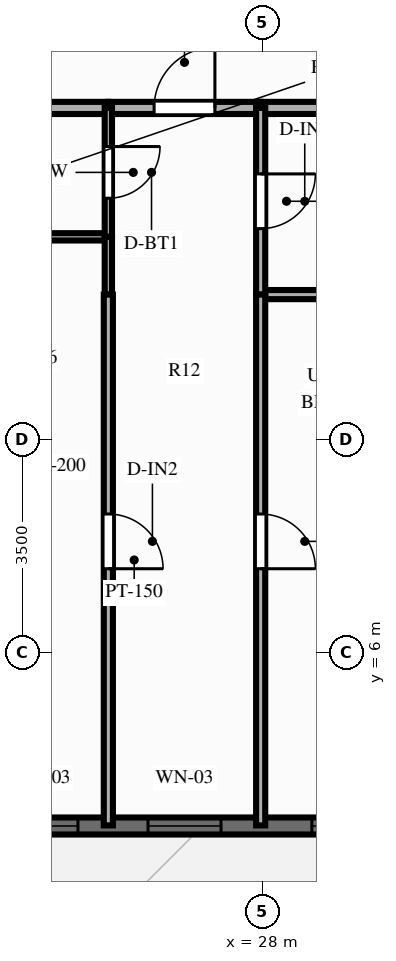
"""IFC4 building model, lengths in metres.
Left out: names, types, materials, properties, quantities, classifications, styles, units other than length and angle.
Written with IfcOpenShell. Run it as: python <this file> out.ifc"""

import sys

from ifc_helpers import new_model, si_unit, direction, frame, frame_2d, origin, place, context, subcontext, project, spatial, rectangle, extrude, source, transform, mapped, element, fill, save


model = new_model("IFC4")
c1 = context("Model", 3, precision=1e-05, world=origin(), true_north=direction((0.0, 1.0)))
c2 = subcontext(c1, "Body", "Model", "MODEL_VIEW")
j1 = project(units=[si_unit("LENGTHUNIT", "METRE"), si_unit("PLANEANGLEUNIT", "RADIAN")], contexts=[c1])
p1 = place(None, origin())
s1 = spatial("IfcSite", under=j1, at=p1, CompositionType="ELEMENT")
p2 = place(p1, origin())
s2 = spatial("IfcBuilding", under=s1, at=p2, CompositionType="ELEMENT")
p3 = place(p2, frame((0.0, 0.0, 25.4)))
s3 = spatial("IfcBuildingStorey", under=s2, at=p3, CompositionType="ELEMENT", Elevation=25.4)
p4 = place(p3, frame((15.5, 3.14, 0.0), z_axis=(0.0, 0.0, 1.0), x_axis=(1.0, 0.0, 0.0)))
e1 = element("IfcWall", 1, at=p4, inside=s3, PredefinedType="SOLIDWALL", context=c2, shape_type="SweptSolid", body=[
    extrude(rectangle(XDim=45.0, YDim=0.28, at=frame_2d((22.5, 0.0))), origin(), (0.0, 0.0, 1.0), 2.28),
])
p5 = place(p4, frame((0.785, 0.0, 0.25)))
e2 = element("IfcOpeningElement", 2, at=p5, cuts=e1, PredefinedType="OPENING", context=c2, shape_type="SweptSolid", body=[
    extrude(rectangle(XDim=1.2, YDim=1.5, at=frame_2d((0.6, 0.75))), frame((0.0, 0.152, 0.0), z_axis=(0.0, -1.0, 0.0), x_axis=(1.0, 0.0, 0.0)), (0.0, 0.0, 1.0), 0.304),
])
p6 = place(p4, frame((3.033, 0.0, 0.25)))
e3 = element("IfcOpeningElement", 3, at=p6, cuts=e1, PredefinedType="OPENING", context=c2, shape_type="SweptSolid", body=[
    extrude(rectangle(XDim=1.2, YDim=1.5, at=frame_2d((0.6, 0.75))), frame((0.0, 0.152, 0.0), z_axis=(0.0, -1.0, 0.0), x_axis=(1.0, 0.0, 0.0)), (0.0, 0.0, 1.0), 0.304),
])
p7 = place(p4, frame((5.727, 0.0, 0.25)))
e4 = element("IfcOpeningElement", 4, at=p7, cuts=e1, PredefinedType="OPENING", context=c2, shape_type="SweptSolid", body=[
    extrude(rectangle(XDim=1.2, YDim=1.5, at=frame_2d((0.6, 0.75))), frame((0.0, 0.152, 0.0), z_axis=(0.0, -1.0, 0.0), x_axis=(1.0, 0.0, 0.0)), (0.0, 0.0, 1.0), 0.304),
])
p8 = place(p4, frame((8.269, 0.0, 0.25)))
e5 = element("IfcOpeningElement", 5, at=p8, cuts=e1, PredefinedType="OPENING", context=c2, shape_type="SweptSolid", body=[
    extrude(rectangle(XDim=1.2, YDim=1.5, at=frame_2d((0.6, 0.75))), frame((0.0, 0.152, 0.0), z_axis=(0.0, -1.0, 0.0), x_axis=(1.0, 0.0, 0.0)), (0.0, 0.0, 1.0), 0.304),
])
p9 = place(p4, frame((10.621, 0.0, 0.25)))
e6 = element("IfcOpeningElement", 6, at=p9, cuts=e1, PredefinedType="OPENING", context=c2, shape_type="SweptSolid", body=[
    extrude(rectangle(XDim=1.2, YDim=1.5, at=frame_2d((0.6, 0.75))), frame((0.0, 0.152, 0.0), z_axis=(0.0, -1.0, 0.0), x_axis=(1.0, 0.0, 0.0)), (0.0, 0.0, 1.0), 0.304),
])
p10 = place(p4, frame((13.316, 0.0, 0.25)))
e7 = element("IfcOpeningElement", 7, at=p10, cuts=e1, PredefinedType="OPENING", context=c2, shape_type="SweptSolid", body=[
    extrude(rectangle(XDim=1.2, YDim=1.5, at=frame_2d((0.6, 0.75))), frame((0.0, 0.152, 0.0), z_axis=(0.0, -1.0, 0.0), x_axis=(1.0, 0.0, 0.0)), (0.0, 0.0, 1.0), 0.304),
])
p11 = place(p4, frame((16.624, 0.0, 0.25)))
e8 = element("IfcOpeningElement", 8, at=p11, cuts=e1, PredefinedType="OPENING", context=c2, shape_type="SweptSolid", body=[
    extrude(rectangle(XDim=0.7, YDim=1.5, at=frame_2d((0.35, 0.75))), frame((0.0, 0.152, 0.0), z_axis=(0.0, -1.0, 0.0), x_axis=(1.0, 0.0, 0.0)), (0.0, 0.0, 1.0), 0.304),
])
p12 = place(p4, frame((18.141, 0.0, 0.25)))
e9 = element("IfcOpeningElement", 9, at=p12, cuts=e1, PredefinedType="OPENING", context=c2, shape_type="SweptSolid", body=[
    extrude(rectangle(XDim=1.2, YDim=1.5, at=frame_2d((0.6, 0.75))), frame((0.0, 0.152, 0.0), z_axis=(0.0, -1.0, 0.0), x_axis=(1.0, 0.0, 0.0)), (0.0, 0.0, 1.0), 0.304),
])
p13 = place(p4, frame((21.874, 0.0, 0.0), z_axis=(0.0, 0.0, 1.0), x_axis=(-1.0, 0.0, 0.0)))
e10 = element("IfcOpeningElement", 10, at=p13, cuts=e1, PredefinedType="OPENING", context=c2, shape_type="SweptSolid", body=[
    extrude(rectangle(XDim=1.1, YDim=2.15, at=frame_2d((0.55, 1.075))), frame((0.0, 0.152, 0.0), z_axis=(0.0, -1.0, 0.0), x_axis=(1.0, 0.0, 0.0)), (0.0, 0.0, 1.0), 0.304),
])
p14 = place(p4, frame((23.223, 0.0, 0.25)))
e11 = element("IfcOpeningElement", 11, at=p14, cuts=e1, PredefinedType="OPENING", context=c2, shape_type="SweptSolid", body=[
    extrude(rectangle(XDim=1.2, YDim=1.5, at=frame_2d((0.6, 0.75))), frame((0.0, 0.152, 0.0), z_axis=(0.0, -1.0, 0.0), x_axis=(1.0, 0.0, 0.0)), (0.0, 0.0, 1.0), 0.304),
])
p15 = place(p4, frame((25.507, 0.0, 0.25)))
e12 = element("IfcOpeningElement", 12, at=p15, cuts=e1, PredefinedType="OPENING", context=c2, shape_type="SweptSolid", body=[
    extrude(rectangle(XDim=1.2, YDim=1.5, at=frame_2d((0.6, 0.75))), frame((0.0, 0.152, 0.0), z_axis=(0.0, -1.0, 0.0), x_axis=(1.0, 0.0, 0.0)), (0.0, 0.0, 1.0), 0.304),
])
p16 = place(p4, frame((27.6, 0.0, 0.25)))
e13 = element("IfcOpeningElement", 13, at=p16, cuts=e1, PredefinedType="OPENING", context=c2, shape_type="SweptSolid", body=[
    extrude(rectangle(XDim=0.7, YDim=1.5, at=frame_2d((0.35, 0.75))), frame((0.0, 0.152, 0.0), z_axis=(0.0, -1.0, 0.0), x_axis=(1.0, 0.0, 0.0)), (0.0, 0.0, 1.0), 0.304),
])
p17 = place(p4, frame((30.589, 0.0, 0.25)))
e14 = element("IfcOpeningElement", 14, at=p17, cuts=e1, PredefinedType="OPENING", context=c2, shape_type="SweptSolid", body=[
    extrude(rectangle(XDim=1.2, YDim=1.5, at=frame_2d((0.6, 0.75))), frame((0.0, 0.152, 0.0), z_axis=(0.0, -1.0, 0.0), x_axis=(1.0, 0.0, 0.0)), (0.0, 0.0, 1.0), 0.304),
])
p18 = place(p4, frame((32.872, 0.0, 0.25)))
e15 = element("IfcOpeningElement", 15, at=p18, cuts=e1, PredefinedType="OPENING", context=c2, shape_type="SweptSolid", body=[
    extrude(rectangle(XDim=1.2, YDim=1.5, at=frame_2d((0.6, 0.75))), frame((0.0, 0.152, 0.0), z_axis=(0.0, -1.0, 0.0), x_axis=(1.0, 0.0, 0.0)), (0.0, 0.0, 1.0), 0.304),
])
p19 = place(p4, frame((35.455, 0.0, 0.25)))
e16 = element("IfcOpeningElement", 16, at=p19, cuts=e1, PredefinedType="OPENING", context=c2, shape_type="SweptSolid", body=[
    extrude(rectangle(XDim=1.2, YDim=1.5, at=frame_2d((0.6, 0.75))), frame((0.0, 0.152, 0.0), z_axis=(0.0, -1.0, 0.0), x_axis=(1.0, 0.0, 0.0)), (0.0, 0.0, 1.0), 0.304),
])
p20 = place(p4, frame((37.954, 0.0, 0.25)))
e17 = element("IfcOpeningElement", 17, at=p20, cuts=e1, PredefinedType="OPENING", context=c2, shape_type="SweptSolid", body=[
    extrude(rectangle(XDim=1.2, YDim=1.5, at=frame_2d((0.6, 0.75))), frame((0.0, 0.152, 0.0), z_axis=(0.0, -1.0, 0.0), x_axis=(1.0, 0.0, 0.0)), (0.0, 0.0, 1.0), 0.304),
])
p21 = place(p4, frame((40.238, 0.0, 0.25)))
e18 = element("IfcOpeningElement", 18, at=p21, cuts=e1, PredefinedType="OPENING", context=c2, shape_type="SweptSolid", body=[
    extrude(rectangle(XDim=1.2, YDim=1.5, at=frame_2d((0.6, 0.75))), frame((0.0, 0.152, 0.0), z_axis=(0.0, -1.0, 0.0), x_axis=(1.0, 0.0, 0.0)), (0.0, 0.0, 1.0), 0.304),
])
p22 = place(p4, frame((42.716, 0.0, 0.25)))
e19 = element("IfcOpeningElement", 19, at=p22, cuts=e1, PredefinedType="OPENING", context=c2, shape_type="SweptSolid", body=[
    extrude(rectangle(XDim=1.2, YDim=1.5, at=frame_2d((0.6, 0.75))), frame((0.0, 0.152, 0.0), z_axis=(0.0, -1.0, 0.0), x_axis=(1.0, 0.0, 0.0)), (0.0, 0.0, 1.0), 0.304),
])
p23 = place(p3, frame((23.269, 14.95, 0.0), z_axis=(0.0, 0.0, 1.0), x_axis=(1.0, 0.0, 0.0)))
e20 = element("IfcWall", 20, at=p23, inside=s3, PredefinedType="PARTITIONING", context=c2, shape_type="SweptSolid", body=[
    extrude(rectangle(XDim=2.2, YDim=0.2, at=frame_2d((1.1, 0.0))), origin(), (0.0, 0.0, 1.0), 2.79),
])
p24 = place(p3, frame((25.469, 14.95, 0.0), z_axis=(0.0, 0.0, 1.0), x_axis=(1.0, 0.0, 0.0)))
e21 = element("IfcWall", 21, at=p24, inside=s3, PredefinedType="PARTITIONING", context=c2, shape_type="SweptSolid", body=[
    extrude(rectangle(XDim=2.505, YDim=0.2, at=frame_2d((1.252, 0.0))), origin(), (0.0, 0.0, 1.0), 2.79),
])
p25 = place(p24, frame((0.752, 0.0, 0.0)))
e22 = element("IfcOpeningElement", 22, at=p25, cuts=e21, PredefinedType="OPENING", context=c2, shape_type="SweptSolid", body=[
    extrude(rectangle(XDim=1.0, YDim=2.15, at=frame_2d((0.5, 1.075))), frame((0.0, 0.112, 0.0), z_axis=(0.0, -1.0, 0.0), x_axis=(1.0, 0.0, 0.0)), (0.0, 0.0, 1.0), 0.224),
])
p26 = place(p3, frame((27.974, 14.95, 0.0), z_axis=(0.0, 0.0, 1.0), x_axis=(1.0, 0.0, 0.0)))
e23 = element("IfcWall", 23, at=p26, inside=s3, PredefinedType="PARTITIONING", context=c2, shape_type="SweptSolid", body=[
    extrude(rectangle(XDim=2.884, YDim=0.2, at=frame_2d((1.442, 0.0))), origin(), (0.0, 0.0, 1.0), 2.79),
])
p27 = place(p3, frame((23.269, 12.83, 0.0), z_axis=(0.0, 0.0, 1.0), x_axis=(1.0, 0.0, 0.0)))
e24 = element("IfcWall", 24, at=p27, inside=s3, PredefinedType="PARTITIONING", context=c2, shape_type="SweptSolid", body=[
    extrude(rectangle(XDim=2.2, YDim=0.12, at=frame_2d((1.1, 0.0))), origin(), (0.0, 0.0, 1.0), 2.79),
])
p28 = place(p3, frame((27.974, 11.88, 0.0), z_axis=(0.0, 0.0, 1.0), x_axis=(1.0, 0.0, 0.0)))
e25 = element("IfcWall", 25, at=p28, inside=s3, PredefinedType="PARTITIONING", context=c2, shape_type="SweptSolid", body=[
    extrude(rectangle(XDim=2.884, YDim=0.15, at=frame_2d((1.442, 0.0))), origin(), (0.0, 0.0, 1.0), 2.79),
])
p29 = place(p3, frame((25.469, 14.95, 0.0), z_axis=(0.0, 0.0, 1.0), x_axis=(0.0, -1.0, 0.0)))
e26 = element("IfcWall", 26, at=p29, inside=s3, PredefinedType="PARTITIONING", context=c2, shape_type="SweptSolid", body=[
    extrude(rectangle(XDim=2.12, YDim=0.12, at=frame_2d((1.06, 0.0))), origin(), (0.0, 0.0, 1.0), 2.79),
])
p30 = place(p29, frame((0.635, 0.0, 0.0)))
e27 = element("IfcOpeningElement", 27, at=p30, cuts=e26, PredefinedType="OPENING", context=c2, shape_type="SweptSolid", body=[
    extrude(rectangle(XDim=0.85, YDim=2.05, at=frame_2d((0.425, 1.025))), frame((0.0, 0.072, 0.0), z_axis=(0.0, -1.0, 0.0), x_axis=(1.0, 0.0, 0.0)), (0.0, 0.0, 1.0), 0.144),
])
p31 = place(p3, frame((25.469, 12.83, 0.0), z_axis=(0.0, 0.0, 1.0), x_axis=(0.0, -1.0, 0.0)))
e28 = element("IfcWall", 28, at=p31, inside=s3, PredefinedType="PARTITIONING", context=c2, shape_type="SweptSolid", body=[
    extrude(rectangle(XDim=0.95, YDim=0.12, at=frame_2d((0.475, 0.0))), origin(), (0.0, 0.0, 1.0), 2.79),
])
p32 = place(p3, frame((25.469, 11.88, 0.0), z_axis=(0.0, 0.0, 1.0), x_axis=(0.0, -1.0, 0.0)))
e29 = element("IfcWall", 29, at=p32, inside=s3, PredefinedType="PARTITIONING", context=c2, shape_type="SweptSolid", body=[
    extrude(rectangle(XDim=8.73, YDim=0.15, at=frame_2d((4.365, 0.0))), origin(), (0.0, 0.0, 1.0), 2.79),
])
p33 = place(p32, frame((3.609, 0.0, 0.0)))
e30 = element("IfcOpeningElement", 30, at=p33, cuts=e29, PredefinedType="OPENING", context=c2, shape_type="SweptSolid", body=[
    extrude(rectangle(XDim=0.9, YDim=2.1, at=frame_2d((0.45, 1.05))), frame((0.0, 0.087, 0.0), z_axis=(0.0, -1.0, 0.0), x_axis=(1.0, 0.0, 0.0)), (0.0, 0.0, 1.0), 0.174),
])
p34 = place(p3, frame((27.974, 14.95, 0.0), z_axis=(0.0, 0.0, 1.0), x_axis=(0.0, -1.0, 0.0)))
e31 = element("IfcWall", 31, at=p34, inside=s3, PredefinedType="PARTITIONING", context=c2, shape_type="SweptSolid", body=[
    extrude(rectangle(XDim=3.07, YDim=0.15, at=frame_2d((1.535, 0.0))), origin(), (0.0, 0.0, 1.0), 2.79),
])
p35 = place(p34, frame((1.085, 0.0, 0.0)))
e32 = element("IfcOpeningElement", 32, at=p35, cuts=e31, PredefinedType="OPENING", context=c2, shape_type="SweptSolid", body=[
    extrude(rectangle(XDim=0.9, YDim=2.1, at=frame_2d((0.45, 1.05))), frame((0.0, 0.087, 0.0), z_axis=(0.0, -1.0, 0.0), x_axis=(1.0, 0.0, 0.0)), (0.0, 0.0, 1.0), 0.174),
])
p36 = place(p3, frame((27.974, 11.88, 0.0), z_axis=(0.0, 0.0, 1.0), x_axis=(0.0, -1.0, 0.0)))
e33 = element("IfcWall", 33, at=p36, inside=s3, PredefinedType="PARTITIONING", context=c2, shape_type="SweptSolid", body=[
    extrude(rectangle(XDim=8.73, YDim=0.15, at=frame_2d((4.365, 0.0))), origin(), (0.0, 0.0, 1.0), 2.79),
])
p37 = place(p36, frame((3.609, 0.0, 0.0)))
e34 = element("IfcOpeningElement", 34, at=p37, cuts=e33, PredefinedType="OPENING", context=c2, shape_type="SweptSolid", body=[
    extrude(rectangle(XDim=0.9, YDim=2.1, at=frame_2d((0.45, 1.05))), frame((0.0, 0.087, 0.0), z_axis=(0.0, -1.0, 0.0), x_axis=(1.0, 0.0, 0.0)), (0.0, 0.0, 1.0), 0.174),
])
m1 = source(origin(), c2, "Body", "SweptSolid", [
    extrude(rectangle(XDim=1.2, YDim=1.5, at=frame_2d((0.6, 0.75))), frame((0.0, 0.03, 0.0), z_axis=(0.0, -1.0, 0.0), x_axis=(1.0, 0.0, 0.0)), (0.0, 0.0, 1.0), 0.06),
])
p38 = place(p8, origin())
e35 = element("IfcWindow", 35, at=p38, inside=s3, PartitioningType="SINGLE_PANEL", PredefinedType="WINDOW", context=c2, shape_type="MappedRepresentation", body=[
    mapped(m1, transform((0.0, 0.0, 0.0), scale=1.0)),
])
fill(e5, e35)
p39 = place(p9, origin())
e36 = element("IfcWindow", 36, at=p39, inside=s3, PartitioningType="SINGLE_PANEL", PredefinedType="WINDOW", context=c2, shape_type="MappedRepresentation", body=[
    mapped(m1, transform((0.0, 0.0, 0.0), scale=1.0)),
])
fill(e6, e36)
p40 = place(p10, origin())
e37 = element("IfcWindow", 37, at=p40, inside=s3, PartitioningType="SINGLE_PANEL", PredefinedType="WINDOW", context=c2, shape_type="MappedRepresentation", body=[
    mapped(m1, transform((0.0, 0.0, 0.0), scale=1.0)),
])
fill(e7, e37)
m2 = source(origin(), c2, "Body", "SweptSolid", [
    extrude(rectangle(XDim=1.0, YDim=2.15, at=frame_2d((0.5, 1.075))), frame((0.0, 0.025, 0.0), z_axis=(0.0, -1.0, 0.0), x_axis=(1.0, 0.0, 0.0)), (0.0, 0.0, 1.0), 0.05),
])
p41 = place(p25, origin())
e38 = element("IfcDoor", 38, at=p41, inside=s3, OperationType="SINGLE_SWING_RIGHT", PredefinedType="DOOR", context=c2, shape_type="MappedRepresentation", body=[
    mapped(m2, transform((0.0, 0.0, 0.0), scale=1.0)),
])
fill(e22, e38)
m3 = source(origin(), c2, "Body", "SweptSolid", [
    extrude(rectangle(XDim=0.85, YDim=2.05, at=frame_2d((0.425, 1.025))), frame((0.0, 0.025, 0.0), z_axis=(0.0, -1.0, 0.0), x_axis=(1.0, 0.0, 0.0)), (0.0, 0.0, 1.0), 0.05),
])
p42 = place(p30, origin())
e39 = element("IfcDoor", 39, at=p42, inside=s3, OperationType="SINGLE_SWING_LEFT", PredefinedType="DOOR", context=c2, shape_type="MappedRepresentation", body=[
    mapped(m3, transform((0.0, 0.0, 0.0), scale=1.0)),
])
fill(e27, e39)
m4 = source(origin(), c2, "Body", "SweptSolid", [
    extrude(rectangle(XDim=0.9, YDim=2.1, at=frame_2d((0.45, 1.05))), frame((0.0, 0.025, 0.0), z_axis=(0.0, -1.0, 0.0), x_axis=(1.0, 0.0, 0.0)), (0.0, 0.0, 1.0), 0.05),
])
p43 = place(p33, origin())
e40 = element("IfcDoor", 40, at=p43, inside=s3, OperationType="SINGLE_SWING_RIGHT", PredefinedType="DOOR", context=c2, shape_type="MappedRepresentation", body=[
    mapped(m4, transform((0.0, 0.0, 0.0), scale=1.0)),
])
fill(e30, e40)
p44 = place(p35, origin())
e41 = element("IfcDoor", 41, at=p44, inside=s3, OperationType="SINGLE_SWING_LEFT", PredefinedType="DOOR", context=c2, shape_type="MappedRepresentation", body=[
    mapped(m4, transform((0.0, 0.0, 0.0), scale=1.0)),
])
fill(e32, e41)
p45 = place(p37, origin())
e42 = element("IfcDoor", 42, at=p45, inside=s3, OperationType="SINGLE_SWING_RIGHT", PredefinedType="DOOR", context=c2, shape_type="MappedRepresentation", body=[
    mapped(m4, transform((0.0, 0.0, 0.0), scale=1.0)),
])
fill(e34, e42)
save(model, sys.argv[1])
